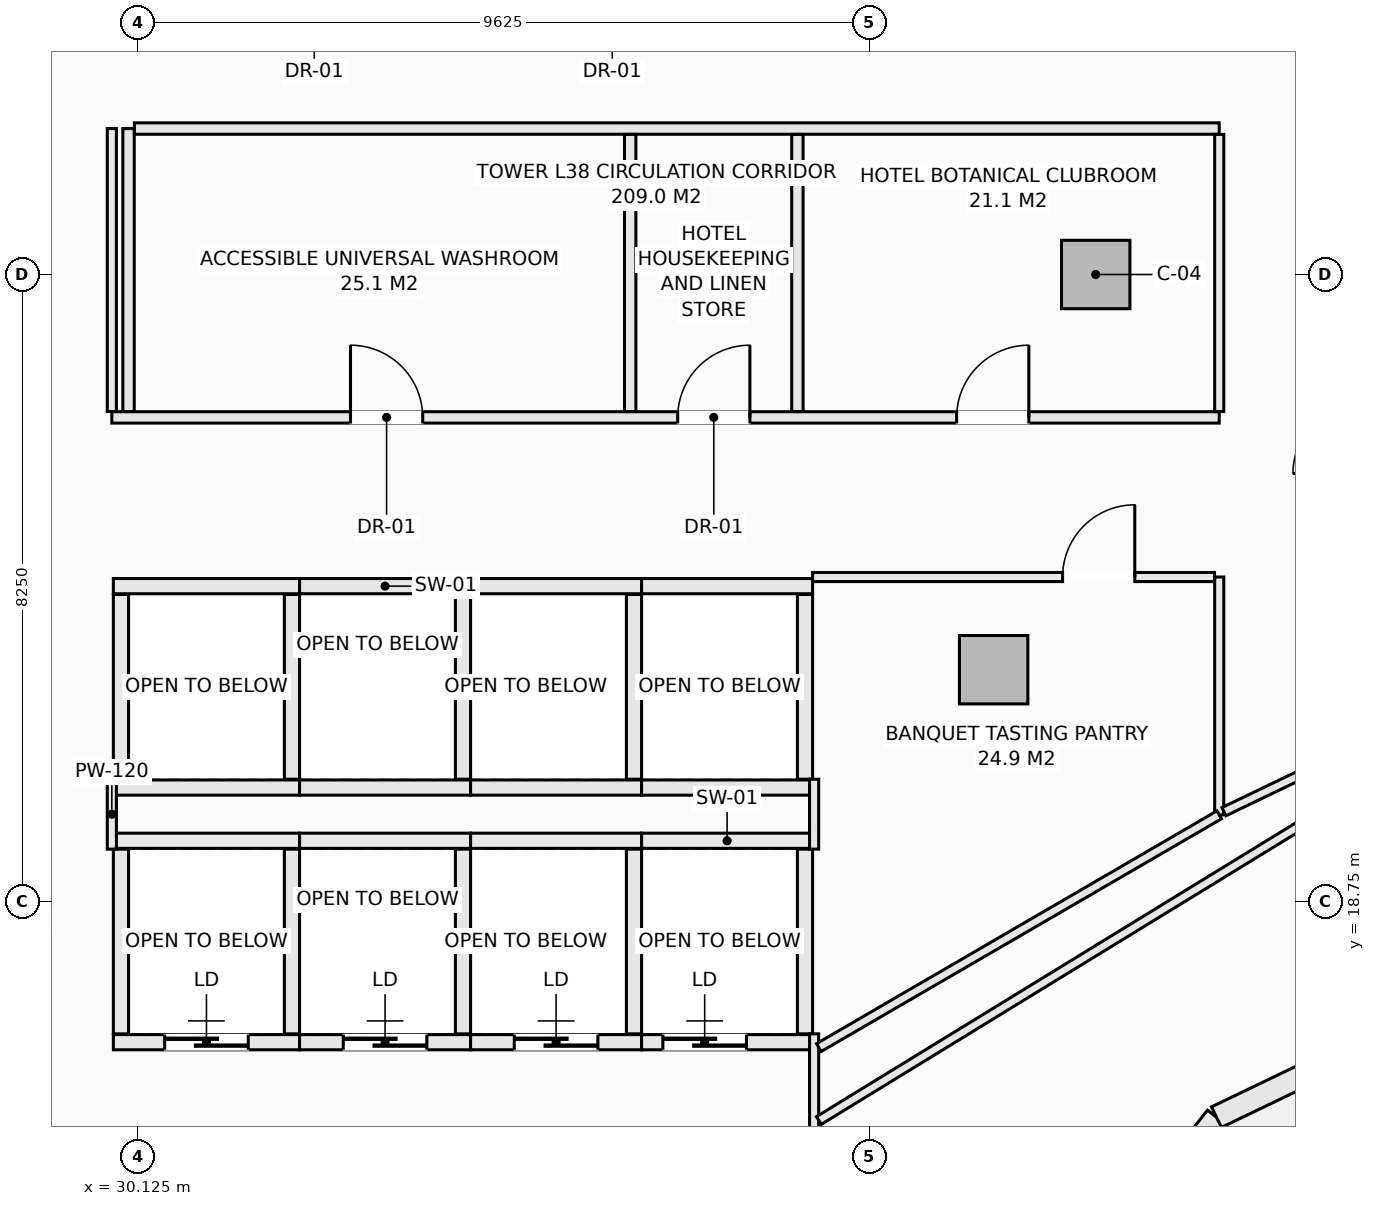
"""IFC4 building model, lengths in metres.
Left out: names, types, materials, properties, quantities, classifications, styles, units other than length and angle.
Written with IfcOpenShell. Run it as: python <this file> out.ifc"""

import sys

from ifc_helpers import new_model, si_unit, direction, frame, frame_2d, origin, origin_2d, place, context, subcontext, project, spatial, rectangle, extrude, element, fill, save


model = new_model("IFC4")
c1 = context("Model", 3, precision=1e-05, world=origin(), true_north=direction((0.0, 1.0)))
c2 = subcontext(c1, "Body", "Model", "MODEL_VIEW")
j1 = project(units=[si_unit("LENGTHUNIT", "METRE"), si_unit("PLANEANGLEUNIT", "RADIAN")], contexts=[c1])
p1 = place(None, origin())
s1 = spatial("IfcSite", under=j1, at=p1, CompositionType="ELEMENT")
p2 = place(p1, origin())
s2 = spatial("IfcBuilding", under=s1, at=p2, CompositionType="ELEMENT")
p3 = place(p2, frame((0.0, 0.0, 149.5)))
s3 = spatial("IfcBuildingStorey", under=s2, at=p3, CompositionType="ELEMENT", Elevation=149.5)
for number, where, z_axis, x_axis in (
    (1, (42.725, 27.0, -0.27), (0.0, 0.0, 1.0), (1.0, 0.0, 0.0)),
    (2, (41.382, 21.801, -0.27), (0.0, 0.0, 1.0), (1.0, 0.0, 0.0)),
):
    element("IfcColumn", number, at=place(p3, frame(where, z_axis=z_axis, x_axis=x_axis)), inside=s3, PredefinedType="COLUMN", context=c2, shape_type="SweptSolid", body=[
        extrude(rectangle(XDim=0.9, YDim=0.9, at=origin_2d()), origin(), (0.0, 0.0, 1.0), 3.4),
    ])
p4 = place(p3, frame((41.094, 11.801, 0.0), z_axis=(0.0, 0.0, 1.0), x_axis=(0.616429245738, 0.787410302828, 0.0)))
e3 = element("IfcWall", 3, at=p4, inside=s3, PredefinedType="SOLIDWALL", context=c2, shape_type="SweptSolid", body=[
    extrude(rectangle(XDim=5.223, YDim=0.3, at=frame_2d((2.612, 0.0))), origin(), (0.0, 0.0, 1.0), 2.653),
])
p5 = place(p4, frame((1.562, 0.0, 0.74)))
e4 = element("IfcOpeningElement", 4, at=p5, cuts=e3, PredefinedType="OPENING", context=c2, shape_type="SweptSolid", body=[
    extrude(rectangle(XDim=2.1, YDim=1.7, at=frame_2d((1.05, 0.85))), frame((0.0, 0.16, 0.0), z_axis=(0.0, -1.0, 0.0), x_axis=(1.0, 0.0, 0.0)), (0.0, 0.0, 1.0), 0.32),
])
p6 = place(p3, frame((44.313, 15.914, 0.0), z_axis=(0.0, 0.0, 1.0), x_axis=(0.901353070301, 0.433085029363, 0.0)))
e5 = element("IfcWall", 5, at=p6, inside=s3, PredefinedType="SOLIDWALL", context=c2, shape_type="SweptSolid", body=[
    extrude(rectangle(XDim=5.336, YDim=0.3, at=frame_2d((2.668, 0.0))), origin(), (0.0, 0.0, 1.0), 2.653),
])
p7 = place(p6, frame((1.768, 0.0, 0.0)))
e6 = element("IfcOpeningElement", 6, at=p7, cuts=e5, PredefinedType="OPENING", context=c2, shape_type="SweptSolid", body=[
    extrude(rectangle(XDim=1.8, YDim=2.25, at=frame_2d((0.9, 1.125))), frame((0.0, 0.16, 0.0), z_axis=(0.0, -1.0, 0.0), x_axis=(1.0, 0.0, 0.0)), (0.0, 0.0, 1.0), 0.32),
])
p8 = place(p3, frame((29.8, 19.55, 0.0), z_axis=(0.0, 0.0, 1.0), x_axis=(1.0, 0.0, 0.0)))
e7 = element("IfcWall", 7, at=p8, inside=s3, PredefinedType="SOLIDWALL", context=c2, shape_type="SweptSolid", body=[
    extrude(rectangle(XDim=2.45, YDim=0.2, at=frame_2d((1.225, 0.0))), origin(), (0.0, 0.0, 1.0), 3.13),
])
p9 = place(p3, frame((29.8, 16.9, 0.0), z_axis=(0.0, 0.0, 1.0), x_axis=(1.0, 0.0, 0.0)))
e8 = element("IfcWall", 8, at=p9, inside=s3, PredefinedType="SOLIDWALL", context=c2, shape_type="SweptSolid", body=[
    extrude(rectangle(XDim=2.45, YDim=0.2, at=frame_2d((1.225, 0.0))), origin(), (0.0, 0.0, 1.0), 3.13),
])
p10 = place(p9, frame((0.675, 0.0, 0.0)))
e9 = element("IfcOpeningElement", 9, at=p10, cuts=e8, PredefinedType="OPENING", context=c2, shape_type="SweptSolid", body=[
    extrude(rectangle(XDim=1.1, YDim=2.2, at=frame_2d((0.55, 1.1))), frame((0.0, 0.11, 0.0), z_axis=(0.0, -1.0, 0.0), x_axis=(1.0, 0.0, 0.0)), (0.0, 0.0, 1.0), 0.22),
])
for number, where, z_axis, x_axis in (
    (10, (29.9, 17.01, 0.0), (0.0, 0.0, 1.0), (0.0, 1.0, 0.0)),
    (11, (32.15, 17.01, 0.0), (0.0, 0.0, 1.0), (0.0, 1.0, 0.0)),
):
    element("IfcWall", number, at=place(p3, frame(where, z_axis=z_axis, x_axis=x_axis)), inside=s3, PredefinedType="SOLIDWALL", context=c2, shape_type="SweptSolid", body=[
        extrude(rectangle(XDim=2.43, YDim=0.2, at=frame_2d((1.215, 0.0))), origin(), (0.0, 0.0, 1.0), 3.13),
    ])
p11 = place(p3, frame((32.25, 19.55, 0.0), z_axis=(0.0, 0.0, 1.0), x_axis=(1.0, 0.0, 0.0)))
e12 = element("IfcWall", 12, at=p11, inside=s3, PredefinedType="SOLIDWALL", context=c2, shape_type="SweptSolid", body=[
    extrude(rectangle(XDim=2.25, YDim=0.2, at=frame_2d((1.125, 0.0))), origin(), (0.0, 0.0, 1.0), 3.13),
])
p12 = place(p3, frame((32.25, 16.9, 0.0), z_axis=(0.0, 0.0, 1.0), x_axis=(1.0, 0.0, 0.0)))
e13 = element("IfcWall", 13, at=p12, inside=s3, PredefinedType="SOLIDWALL", context=c2, shape_type="SweptSolid", body=[
    extrude(rectangle(XDim=2.25, YDim=0.2, at=frame_2d((1.125, 0.0))), origin(), (0.0, 0.0, 1.0), 3.13),
])
p13 = place(p12, frame((0.575, 0.0, 0.0)))
e14 = element("IfcOpeningElement", 14, at=p13, cuts=e13, PredefinedType="OPENING", context=c2, shape_type="SweptSolid", body=[
    extrude(rectangle(XDim=1.1, YDim=2.2, at=frame_2d((0.55, 1.1))), frame((0.0, 0.11, 0.0), z_axis=(0.0, -1.0, 0.0), x_axis=(1.0, 0.0, 0.0)), (0.0, 0.0, 1.0), 0.22),
])
p14 = place(p3, frame((34.4, 17.01, 0.0), z_axis=(0.0, 0.0, 1.0), x_axis=(0.0, 1.0, 0.0)))
e15 = element("IfcWall", 15, at=p14, inside=s3, PredefinedType="SOLIDWALL", context=c2, shape_type="SweptSolid", body=[
    extrude(rectangle(XDim=2.43, YDim=0.2, at=frame_2d((1.215, 0.0))), origin(), (0.0, 0.0, 1.0), 3.13),
])
p15 = place(p3, frame((34.5, 19.55, 0.0), z_axis=(0.0, 0.0, 1.0), x_axis=(1.0, 0.0, 0.0)))
e16 = element("IfcWall", 16, at=p15, inside=s3, PredefinedType="SOLIDWALL", context=c2, shape_type="SweptSolid", body=[
    extrude(rectangle(XDim=2.25, YDim=0.2, at=frame_2d((1.125, 0.0))), origin(), (0.0, 0.0, 1.0), 3.13),
])
p16 = place(p3, frame((34.5, 16.9, 0.0), z_axis=(0.0, 0.0, 1.0), x_axis=(1.0, 0.0, 0.0)))
e17 = element("IfcWall", 17, at=p16, inside=s3, PredefinedType="SOLIDWALL", context=c2, shape_type="SweptSolid", body=[
    extrude(rectangle(XDim=2.25, YDim=0.2, at=frame_2d((1.125, 0.0))), origin(), (0.0, 0.0, 1.0), 3.13),
])
p17 = place(p16, frame((0.575, 0.0, 0.0)))
e18 = element("IfcOpeningElement", 18, at=p17, cuts=e17, PredefinedType="OPENING", context=c2, shape_type="SweptSolid", body=[
    extrude(rectangle(XDim=1.1, YDim=2.2, at=frame_2d((0.55, 1.1))), frame((0.0, 0.11, 0.0), z_axis=(0.0, -1.0, 0.0), x_axis=(1.0, 0.0, 0.0)), (0.0, 0.0, 1.0), 0.22),
])
p18 = place(p3, frame((36.65, 17.01, 0.0), z_axis=(0.0, 0.0, 1.0), x_axis=(0.0, 1.0, 0.0)))
e19 = element("IfcWall", 19, at=p18, inside=s3, PredefinedType="SOLIDWALL", context=c2, shape_type="SweptSolid", body=[
    extrude(rectangle(XDim=2.43, YDim=0.2, at=frame_2d((1.215, 0.0))), origin(), (0.0, 0.0, 1.0), 3.13),
])
p19 = place(p3, frame((36.75, 19.55, 0.0), z_axis=(0.0, 0.0, 1.0), x_axis=(1.0, 0.0, 0.0)))
e20 = element("IfcWall", 20, at=p19, inside=s3, PredefinedType="SOLIDWALL", context=c2, shape_type="SweptSolid", body=[
    extrude(rectangle(XDim=2.25, YDim=0.2, at=frame_2d((1.125, 0.0))), origin(), (0.0, 0.0, 1.0), 3.13),
])
p20 = place(p3, frame((36.75, 16.9, 0.0), z_axis=(0.0, 0.0, 1.0), x_axis=(1.0, 0.0, 0.0)))
e21 = element("IfcWall", 21, at=p20, inside=s3, PredefinedType="SOLIDWALL", context=c2, shape_type="SweptSolid", body=[
    extrude(rectangle(XDim=2.25, YDim=0.2, at=frame_2d((1.125, 0.0))), origin(), (0.0, 0.0, 1.0), 3.13),
])
p21 = place(p20, frame((0.28, 0.0, 0.0)))
e22 = element("IfcOpeningElement", 22, at=p21, cuts=e21, PredefinedType="OPENING", context=c2, shape_type="SweptSolid", body=[
    extrude(rectangle(XDim=1.1, YDim=2.2, at=frame_2d((0.55, 1.1))), frame((0.0, 0.11, 0.0), z_axis=(0.0, -1.0, 0.0), x_axis=(1.0, 0.0, 0.0)), (0.0, 0.0, 1.0), 0.22),
])
p22 = place(p3, frame((38.9, 17.01, 0.0), z_axis=(0.0, 0.0, 1.0), x_axis=(0.0, 1.0, 0.0)))
e23 = element("IfcWall", 23, at=p22, inside=s3, PredefinedType="SOLIDWALL", context=c2, shape_type="SweptSolid", body=[
    extrude(rectangle(XDim=2.43, YDim=0.2, at=frame_2d((1.215, 0.0))), origin(), (0.0, 0.0, 1.0), 3.13),
])
for number, where, z_axis, x_axis in (
    (24, (29.8, 22.9, 0.0), (0.0, 0.0, 1.0), (1.0, 0.0, 0.0)),
    (25, (29.8, 20.25, 0.0), (0.0, 0.0, 1.0), (1.0, 0.0, 0.0)),
):
    element("IfcWall", number, at=place(p3, frame(where, z_axis=z_axis, x_axis=x_axis)), inside=s3, PredefinedType="SOLIDWALL", context=c2, shape_type="SweptSolid", body=[
        extrude(rectangle(XDim=2.45, YDim=0.2, at=frame_2d((1.225, 0.0))), origin(), (0.0, 0.0, 1.0), 3.13),
    ])
for number, where, z_axis, x_axis in (
    (26, (29.9, 20.36, 0.0), (0.0, 0.0, 1.0), (0.0, 1.0, 0.0)),
    (27, (32.15, 20.36, 0.0), (0.0, 0.0, 1.0), (0.0, 1.0, 0.0)),
):
    element("IfcWall", number, at=place(p3, frame(where, z_axis=z_axis, x_axis=x_axis)), inside=s3, PredefinedType="SOLIDWALL", context=c2, shape_type="SweptSolid", body=[
        extrude(rectangle(XDim=2.43, YDim=0.2, at=frame_2d((1.215, 0.0))), origin(), (0.0, 0.0, 1.0), 3.13),
    ])
for number, where, z_axis, x_axis in (
    (28, (32.25, 22.9, 0.0), (0.0, 0.0, 1.0), (1.0, 0.0, 0.0)),
    (29, (32.25, 20.25, 0.0), (0.0, 0.0, 1.0), (1.0, 0.0, 0.0)),
):
    element("IfcWall", number, at=place(p3, frame(where, z_axis=z_axis, x_axis=x_axis)), inside=s3, PredefinedType="SOLIDWALL", context=c2, shape_type="SweptSolid", body=[
        extrude(rectangle(XDim=2.25, YDim=0.2, at=frame_2d((1.125, 0.0))), origin(), (0.0, 0.0, 1.0), 3.13),
    ])
p23 = place(p3, frame((34.4, 20.36, 0.0), z_axis=(0.0, 0.0, 1.0), x_axis=(0.0, 1.0, 0.0)))
e30 = element("IfcWall", 30, at=p23, inside=s3, PredefinedType="SOLIDWALL", context=c2, shape_type="SweptSolid", body=[
    extrude(rectangle(XDim=2.43, YDim=0.2, at=frame_2d((1.215, 0.0))), origin(), (0.0, 0.0, 1.0), 3.13),
])
for number, where, z_axis, x_axis in (
    (31, (34.5, 22.9, 0.0), (0.0, 0.0, 1.0), (1.0, 0.0, 0.0)),
    (32, (34.5, 20.25, 0.0), (0.0, 0.0, 1.0), (1.0, 0.0, 0.0)),
):
    element("IfcWall", number, at=place(p3, frame(where, z_axis=z_axis, x_axis=x_axis)), inside=s3, PredefinedType="SOLIDWALL", context=c2, shape_type="SweptSolid", body=[
        extrude(rectangle(XDim=2.25, YDim=0.2, at=frame_2d((1.125, 0.0))), origin(), (0.0, 0.0, 1.0), 3.13),
    ])
p24 = place(p3, frame((36.65, 20.36, 0.0), z_axis=(0.0, 0.0, 1.0), x_axis=(0.0, 1.0, 0.0)))
e33 = element("IfcWall", 33, at=p24, inside=s3, PredefinedType="SOLIDWALL", context=c2, shape_type="SweptSolid", body=[
    extrude(rectangle(XDim=2.43, YDim=0.2, at=frame_2d((1.215, 0.0))), origin(), (0.0, 0.0, 1.0), 3.13),
])
for number, where, z_axis, x_axis in (
    (34, (36.75, 22.9, 0.0), (0.0, 0.0, 1.0), (1.0, 0.0, 0.0)),
    (35, (36.75, 20.25, 0.0), (0.0, 0.0, 1.0), (1.0, 0.0, 0.0)),
):
    element("IfcWall", number, at=place(p3, frame(where, z_axis=z_axis, x_axis=x_axis)), inside=s3, PredefinedType="SOLIDWALL", context=c2, shape_type="SweptSolid", body=[
        extrude(rectangle(XDim=2.25, YDim=0.2, at=frame_2d((1.125, 0.0))), origin(), (0.0, 0.0, 1.0), 3.13),
    ])
p25 = place(p3, frame((38.9, 20.36, 0.0), z_axis=(0.0, 0.0, 1.0), x_axis=(0.0, 1.0, 0.0)))
e36 = element("IfcWall", 36, at=p25, inside=s3, PredefinedType="SOLIDWALL", context=c2, shape_type="SweptSolid", body=[
    extrude(rectangle(XDim=2.43, YDim=0.2, at=frame_2d((1.215, 0.0))), origin(), (0.0, 0.0, 1.0), 3.13),
])
p26 = place(p3, frame((29.78, 25.12, 0.0), z_axis=(0.0, 0.0, 1.0), x_axis=(1.0, 0.0, 0.0)))
e37 = element("IfcWall", 37, at=p26, inside=s3, PredefinedType="PARTITIONING", context=c2, shape_type="SweptSolid", body=[
    extrude(rectangle(XDim=14.57, YDim=0.15, at=frame_2d((7.285, 0.0))), origin(), (0.0, 0.0, 1.0), 3.13),
])
p27 = place(p26, frame((3.14, 0.0, 0.0)))
e38 = element("IfcOpeningElement", 38, at=p27, cuts=e37, PredefinedType="OPENING", context=c2, shape_type="SweptSolid", body=[
    extrude(rectangle(XDim=0.95, YDim=2.1, at=frame_2d((0.475, 1.05))), frame((0.0, 0.085, 0.0), z_axis=(0.0, -1.0, 0.0), x_axis=(1.0, 0.0, 0.0)), (0.0, 0.0, 1.0), 0.17),
])
p28 = place(p26, frame((7.445, 0.0, 0.0)))
e39 = element("IfcOpeningElement", 39, at=p28, cuts=e37, PredefinedType="OPENING", context=c2, shape_type="SweptSolid", body=[
    extrude(rectangle(XDim=0.95, YDim=2.1, at=frame_2d((0.475, 1.05))), frame((0.0, 0.085, 0.0), z_axis=(0.0, -1.0, 0.0), x_axis=(1.0, 0.0, 0.0)), (0.0, 0.0, 1.0), 0.17),
])
p29 = place(p26, frame((11.115, 0.0, 0.0)))
e40 = element("IfcOpeningElement", 40, at=p29, cuts=e37, PredefinedType="OPENING", context=c2, shape_type="SweptSolid", body=[
    extrude(rectangle(XDim=0.95, YDim=2.1, at=frame_2d((0.475, 1.05))), frame((0.0, 0.085, 0.0), z_axis=(0.0, -1.0, 0.0), x_axis=(1.0, 0.0, 0.0)), (0.0, 0.0, 1.0), 0.17),
])
p30 = place(p3, frame((30.0, 25.197, 0.0), z_axis=(0.0, 0.0, 1.0), x_axis=(0.0, 1.0, 0.0)))
e41 = element("IfcWall", 41, at=p30, inside=s3, PredefinedType="PARTITIONING", context=c2, shape_type="SweptSolid", body=[
    extrude(rectangle(XDim=3.723, YDim=0.15, at=frame_2d((1.861, 0.0))), origin(), (0.0, 0.0, 1.0), 3.13),
])
p31 = place(p3, frame((30.077, 28.92, 0.0), z_axis=(0.0, 0.0, 1.0), x_axis=(1.0, 0.0, 0.0)))
e42 = element("IfcWall", 42, at=p31, inside=s3, PredefinedType="PARTITIONING", context=c2, shape_type="SweptSolid", body=[
    extrude(rectangle(XDim=14.273, YDim=0.15, at=frame_2d((7.137, 0.0))), origin(), (0.0, 0.0, 1.0), 3.13),
])
for number, where, z_axis, x_axis in (
    (43, (36.6, 25.197, 0.0), (0.0, 0.0, 1.0), (0.0, 1.0, 0.0)),
    (44, (38.8, 25.197, 0.0), (0.0, 0.0, 1.0), (0.0, 1.0, 0.0)),
):
    element("IfcWall", number, at=place(p3, frame(where, z_axis=z_axis, x_axis=x_axis)), inside=s3, PredefinedType="PARTITIONING", context=c2, shape_type="SweptSolid", body=[
        extrude(rectangle(XDim=3.646, YDim=0.15, at=frame_2d((1.823, 0.0))), origin(), (0.0, 0.0, 1.0), 3.13),
    ])
p32 = place(p3, frame((39.02, 15.65, 0.0), z_axis=(0.0, 0.0, 1.0), x_axis=(0.0, 1.0, 0.0)))
e45 = element("IfcWall", 45, at=p32, inside=s3, PredefinedType="PARTITIONING", context=c2, shape_type="SweptSolid", body=[
    extrude(rectangle(XDim=1.36, YDim=0.12, at=frame_2d((0.68, 0.0))), origin(), (0.0, 0.0, 1.0), 2.505),
])
for number, where, z_axis, x_axis in (
    (46, (39.02, 19.44, 0.0), (0.0, 0.0, 1.0), (0.0, 1.0, 0.0)),
    (47, (29.78, 19.44, 0.0), (0.0, 0.0, 1.0), (0.0, 1.0, 0.0)),
):
    element("IfcWall", number, at=place(p3, frame(where, z_axis=z_axis, x_axis=x_axis)), inside=s3, PredefinedType="PARTITIONING", context=c2, shape_type="SweptSolid", body=[
        extrude(rectangle(XDim=0.92, YDim=0.12, at=frame_2d((0.46, 0.0))), origin(), (0.0, 0.0, 1.0), 3.13),
    ])
p33 = place(p3, frame((29.78, 25.197, 0.0), z_axis=(0.0, 0.0, 1.0), x_axis=(0.0, 1.0, 0.0)))
e48 = element("IfcWall", 48, at=p33, inside=s3, PredefinedType="PARTITIONING", context=c2, shape_type="SweptSolid", body=[
    extrude(rectangle(XDim=3.723, YDim=0.12, at=frame_2d((1.861, 0.0))), origin(), (0.0, 0.0, 1.0), 3.13),
])
p34 = place(p3, frame((44.35, 19.891, 0.0), z_axis=(0.0, 0.0, 1.0), x_axis=(0.0, 1.0, 0.0)))
e49 = element("IfcWall", 49, at=p34, inside=s3, PredefinedType="PARTITIONING", context=c2, shape_type="SweptSolid", body=[
    extrude(rectangle(XDim=3.129, YDim=0.12, at=frame_2d((1.564, 0.0))), origin(), (0.0, 0.0, 1.0), 3.13),
])
p35 = place(p3, frame((44.35, 25.197, 0.0), z_axis=(0.0, 0.0, 1.0), x_axis=(0.0, 1.0, 0.0)))
e50 = element("IfcWall", 50, at=p35, inside=s3, PredefinedType="PARTITIONING", context=c2, shape_type="SweptSolid", body=[
    extrude(rectangle(XDim=3.646, YDim=0.12, at=frame_2d((1.823, 0.0))), origin(), (0.0, 0.0, 1.0), 3.13),
])
p36 = place(p3, frame((44.412, 19.933, 0.0), z_axis=(0.0, 0.0, 1.0), x_axis=(0.90128266231, 0.433231534656, 0.0)))
e51 = element("IfcWall", 51, at=p36, inside=s3, PredefinedType="PARTITIONING", context=c2, shape_type="SweptSolid", body=[
    extrude(rectangle(XDim=2.062, YDim=0.12, at=frame_2d((1.031, 0.0))), origin(), (0.0, 0.0, 1.0), 3.13),
])
p37 = place(p3, frame((39.0, 23.02, 0.0), z_axis=(0.0, 0.0, 1.0), x_axis=(1.0, 0.0, 0.0)))
e52 = element("IfcWall", 52, at=p37, inside=s3, PredefinedType="PARTITIONING", context=c2, shape_type="SweptSolid", body=[
    extrude(rectangle(XDim=5.288, YDim=0.12, at=frame_2d((2.644, 0.0))), origin(), (0.0, 0.0, 1.0), 3.13),
])
p38 = place(p37, frame((3.289, 0.0, 0.0)))
e53 = element("IfcOpeningElement", 53, at=p38, cuts=e52, PredefinedType="OPENING", context=c2, shape_type="SweptSolid", body=[
    extrude(rectangle(XDim=0.95, YDim=2.1, at=frame_2d((0.475, 1.05))), frame((0.0, 0.07, 0.0), z_axis=(0.0, -1.0, 0.0), x_axis=(1.0, 0.0, 0.0)), (0.0, 0.0, 1.0), 0.14),
])
p39 = place(p3, frame((39.082, 15.87, 0.0), z_axis=(0.0, 0.0, 1.0), x_axis=(0.852607858044, 0.522551280165, 0.0)))
e54 = element("IfcWall", 54, at=p39, inside=s3, PredefinedType="PARTITIONING", context=c2, shape_type="SweptSolid", body=[
    extrude(rectangle(XDim=14.342, YDim=0.12, at=frame_2d((7.171, 0.0))), origin(), (0.0, 0.0, 1.0), 2.505),
])
p40 = place(p3, frame((39.082, 16.829, 0.0), z_axis=(0.0, 0.0, 1.0), x_axis=(0.864565483681, 0.502520173155, 0.0)))
e55 = element("IfcWall", 55, at=p40, inside=s3, PredefinedType="PARTITIONING", context=c2, shape_type="SweptSolid", body=[
    extrude(rectangle(XDim=6.093, YDim=0.12, at=frame_2d((3.047, 0.0))), origin(), (0.0, 0.0, 1.0), 2.505),
])
p41 = place(p10, origin())
e56 = element("IfcDoor", 56, at=p41, inside=s3, OperationType="SLIDING_TO_LEFT", PredefinedType="DOOR", context=c2, shape_type="SweptSolid", body=[
    extrude(rectangle(XDim=1.1, YDim=2.2, at=frame_2d((0.55, 1.1))), frame((0.0, 0.025, 0.0), z_axis=(0.0, -1.0, 0.0), x_axis=(1.0, 0.0, 0.0)), (0.0, 0.0, 1.0), 0.05),
])
fill(e9, e56)
p42 = place(p13, origin())
e57 = element("IfcDoor", 57, at=p42, inside=s3, OperationType="SLIDING_TO_LEFT", PredefinedType="DOOR", context=c2, shape_type="SweptSolid", body=[
    extrude(rectangle(XDim=1.1, YDim=2.2, at=frame_2d((0.55, 1.1))), frame((0.0, 0.025, 0.0), z_axis=(0.0, -1.0, 0.0), x_axis=(1.0, 0.0, 0.0)), (0.0, 0.0, 1.0), 0.05),
])
fill(e14, e57)
p43 = place(p17, origin())
e58 = element("IfcDoor", 58, at=p43, inside=s3, OperationType="SLIDING_TO_LEFT", PredefinedType="DOOR", context=c2, shape_type="SweptSolid", body=[
    extrude(rectangle(XDim=1.1, YDim=2.2, at=frame_2d((0.55, 1.1))), frame((0.0, 0.025, 0.0), z_axis=(0.0, -1.0, 0.0), x_axis=(1.0, 0.0, 0.0)), (0.0, 0.0, 1.0), 0.05),
])
fill(e18, e58)
p44 = place(p21, origin())
e59 = element("IfcDoor", 59, at=p44, inside=s3, OperationType="SLIDING_TO_LEFT", PredefinedType="DOOR", context=c2, shape_type="SweptSolid", body=[
    extrude(rectangle(XDim=1.1, YDim=2.2, at=frame_2d((0.55, 1.1))), frame((0.0, 0.025, 0.0), z_axis=(0.0, -1.0, 0.0), x_axis=(1.0, 0.0, 0.0)), (0.0, 0.0, 1.0), 0.05),
])
fill(e22, e59)
p45 = place(p27, origin())
e60 = element("IfcDoor", 60, at=p45, inside=s3, OperationType="SINGLE_SWING_LEFT", PredefinedType="DOOR", context=c2, shape_type="SweptSolid", body=[
    extrude(rectangle(XDim=0.95, YDim=2.1, at=frame_2d((0.475, 1.05))), frame((0.0, 0.025, 0.0), z_axis=(0.0, -1.0, 0.0), x_axis=(1.0, 0.0, 0.0)), (0.0, 0.0, 1.0), 0.05),
])
fill(e38, e60)
p46 = place(p28, origin())
e61 = element("IfcDoor", 61, at=p46, inside=s3, OperationType="SINGLE_SWING_RIGHT", PredefinedType="DOOR", context=c2, shape_type="SweptSolid", body=[
    extrude(rectangle(XDim=0.95, YDim=2.1, at=frame_2d((0.475, 1.05))), frame((0.0, 0.025, 0.0), z_axis=(0.0, -1.0, 0.0), x_axis=(1.0, 0.0, 0.0)), (0.0, 0.0, 1.0), 0.05),
])
fill(e39, e61)
p47 = place(p38, origin())
e62 = element("IfcDoor", 62, at=p47, inside=s3, OperationType="SINGLE_SWING_RIGHT", PredefinedType="DOOR", context=c2, shape_type="SweptSolid", body=[
    extrude(rectangle(XDim=0.95, YDim=2.1, at=frame_2d((0.475, 1.05))), frame((0.0, 0.025, 0.0), z_axis=(0.0, -1.0, 0.0), x_axis=(1.0, 0.0, 0.0)), (0.0, 0.0, 1.0), 0.05),
])
fill(e53, e62)
p48 = place(p29, origin())
e63 = element("IfcDoor", 63, at=p48, inside=s3, OperationType="SINGLE_SWING_RIGHT", PredefinedType="DOOR", context=c2, shape_type="SweptSolid", body=[
    extrude(rectangle(XDim=0.95, YDim=2.1, at=frame_2d((0.475, 1.05))), frame((0.0, 0.025, 0.0), z_axis=(0.0, -1.0, 0.0), x_axis=(1.0, 0.0, 0.0)), (0.0, 0.0, 1.0), 0.05),
])
fill(e40, e63)
save(model, sys.argv[1])
